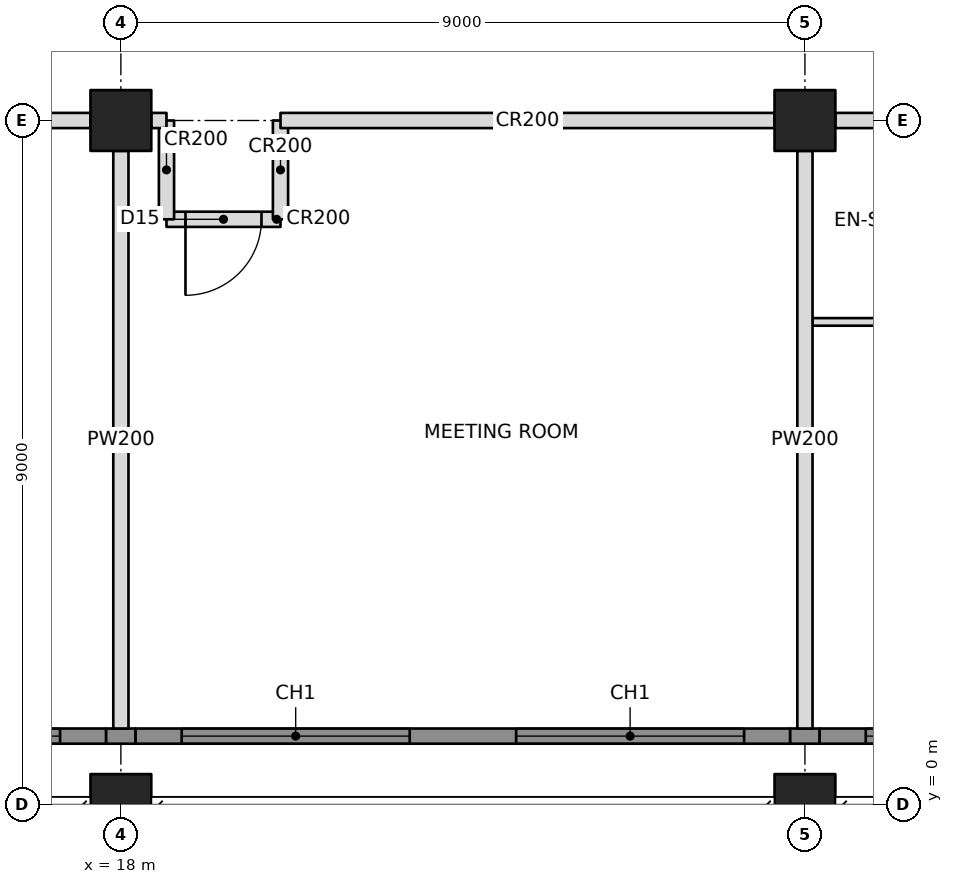
"""IFC4 building model, lengths in metres.
Left out: names, types, materials, properties, quantities, classifications, styles, units other than length and angle.
Written with IfcOpenShell. Run it as: python <this file> out.ifc"""

import sys

from ifc_helpers import new_model, si_unit, direction, frame, frame_2d, origin, origin_2d, place, context, subcontext, project, spatial, rectangle, hollow_rectangle, extrude, element, fill, save


model = new_model("IFC4")
c1 = context("Model", 3, precision=1e-05, world=origin(), true_north=direction((0.0, 1.0)))
c2 = subcontext(c1, "Body", "Model", "MODEL_VIEW")
j1 = project(units=[si_unit("LENGTHUNIT", "METRE"), si_unit("PLANEANGLEUNIT", "RADIAN")], contexts=[c1])
p1 = place(None, origin())
s1 = spatial("IfcSite", under=j1, at=p1, CompositionType="ELEMENT")
p2 = place(p1, origin())
s2 = spatial("IfcBuilding", under=s1, at=p2, CompositionType="ELEMENT")
p3 = place(p2, frame((0.0, 0.0, 28.0)))
s3 = spatial("IfcBuildingStorey", under=s2, at=p3, CompositionType="ELEMENT", Elevation=28.0)
for number, where, z_axis, x_axis in (
    (1, (18.0, 0.0, 0.0), (0.0, 0.0, 1.0), (1.0, 0.0, 0.0)),
    (2, (18.0, 9.0, 0.0), (0.0, 0.0, 1.0), (1.0, 0.0, 0.0)),
    (3, (27.0, 0.0, 0.0), (0.0, 0.0, 1.0), (1.0, 0.0, 0.0)),
    (4, (27.0, 9.0, 0.0), (0.0, 0.0, 1.0), (1.0, 0.0, 0.0)),
):
    element("IfcColumn", number, at=place(p3, frame(where, z_axis=z_axis, x_axis=x_axis)), inside=s3, PredefinedType="COLUMN", context=c2, shape_type="SweptSolid", body=[
        extrude(hollow_rectangle(XDim=0.8, YDim=0.8, WallThickness=0.1, at=origin_2d()), origin(), (0.0, 0.0, 1.0), 3.4),
    ])
p4 = place(p3, frame((18.4, 9.0, 0.0), z_axis=(0.0, 0.0, 1.0), x_axis=(1.0, 0.0, 0.0)))
e5 = element("IfcWall", 5, at=p4, inside=s3, PredefinedType="PARTITIONING", context=c2, shape_type="SweptSolid", body=[
    extrude(rectangle(XDim=0.2, YDim=0.2, at=frame_2d((0.1, 0.0))), origin(), (0.0, 0.0, 1.0), 2.405),
])
p5 = place(p3, frame((27.4, 9.0, 0.0), z_axis=(0.0, 0.0, 1.0), x_axis=(1.0, 0.0, 0.0)))
e6 = element("IfcWall", 6, at=p5, inside=s3, PredefinedType="PARTITIONING", context=c2, shape_type="SweptSolid", body=[
    extrude(rectangle(XDim=8.2, YDim=0.2, at=frame_2d((4.1, 0.0))), origin(), (0.0, 0.0, 1.0), 2.405),
])
p6 = place(p5, frame((2.95, 0.0, 0.0)))
e7 = element("IfcOpeningElement", 7, at=p6, cuts=e6, PredefinedType="OPENING", context=c2, shape_type="SweptSolid", body=[
    extrude(rectangle(XDim=0.9, YDim=2.1, at=frame_2d((0.45, 1.05))), frame((0.0, 0.11, 0.0), z_axis=(0.0, -1.0, 0.0), x_axis=(1.0, 0.0, 0.0)), (0.0, 0.0, 1.0), 0.22),
])
p7 = place(p5, frame((4.35, 0.0, 0.0)))
e8 = element("IfcOpeningElement", 8, at=p7, cuts=e6, PredefinedType="OPENING", context=c2, shape_type="SweptSolid", body=[
    extrude(rectangle(XDim=1.0, YDim=2.1, at=frame_2d((0.5, 1.05))), frame((0.0, 0.11, 0.0), z_axis=(0.0, -1.0, 0.0), x_axis=(1.0, 0.0, 0.0)), (0.0, 0.0, 1.0), 0.22),
])
for number, where, z_axis, x_axis in (
    (9, (18.0, 8.6, 0.0), (0.0, 0.0, 1.0), (0.0, -1.0, 0.0)),
    (10, (27.0, 8.6, 0.0), (0.0, 0.0, 1.0), (0.0, -1.0, 0.0)),
):
    element("IfcWall", number, at=place(p3, frame(where, z_axis=z_axis, x_axis=x_axis)), inside=s3, PredefinedType="PARTITIONING", context=c2, shape_type="SweptSolid", body=[
        extrude(rectangle(XDim=7.6, YDim=0.2, at=frame_2d((3.8, 0.0))), origin(), (0.0, 0.0, 1.0), 2.405),
    ])
for number, where, z_axis, x_axis in (
    (11, (11.1, 9.0, 0.0), (0.0, 0.0, 1.0), (1.0, 0.0, 0.0)),
    (12, (20.1, 9.0, 0.0), (0.0, 0.0, 1.0), (1.0, 0.0, 0.0)),
):
    element("IfcWall", number, at=place(p3, frame(where, z_axis=z_axis, x_axis=x_axis)), inside=s3, PredefinedType="PARTITIONING", context=c2, shape_type="SweptSolid", body=[
        extrude(rectangle(XDim=6.5, YDim=0.2, at=frame_2d((3.25, 0.0))), origin(), (0.0, 0.0, 1.0), 2.405),
    ])
for number, where, z_axis, x_axis in (
    (13, (18.6, 9.0, 0.0), (0.0, 0.0, 1.0), (0.0, -1.0, 0.0)),
    (14, (20.1, 9.0, 0.0), (0.0, 0.0, 1.0), (0.0, -1.0, 0.0)),
):
    element("IfcWall", number, at=place(p3, frame(where, z_axis=z_axis, x_axis=x_axis)), inside=s3, PredefinedType="PARTITIONING", context=c2, shape_type="SweptSolid", body=[
        extrude(rectangle(XDim=1.3, YDim=0.2, at=frame_2d((0.65, 0.0))), origin(), (0.0, 0.0, 1.0), 2.404),
    ])
p8 = place(p3, frame((18.6, 7.7, 0.0), z_axis=(0.0, 0.0, 1.0), x_axis=(1.0, 0.0, 0.0)))
e15 = element("IfcWall", 15, at=p8, inside=s3, PredefinedType="PARTITIONING", context=c2, shape_type="SweptSolid", body=[
    extrude(rectangle(XDim=1.5, YDim=0.2, at=frame_2d((0.75, 0.0))), origin(), (0.0, 0.0, 1.0), 3.2),
])
p9 = place(p8, frame((0.25, 0.0, 0.0)))
e16 = element("IfcOpeningElement", 16, at=p9, cuts=e15, PredefinedType="OPENING", context=c2, shape_type="SweptSolid", body=[
    extrude(rectangle(XDim=1.0, YDim=2.1, at=frame_2d((0.5, 1.05))), frame((0.0, 0.11, 0.0), z_axis=(0.0, -1.0, 0.0), x_axis=(1.0, 0.0, 0.0)), (0.0, 0.0, 1.0), 0.22),
])
p10 = place(p3, frame((27.1, 6.35, 0.0), z_axis=(0.0, 0.0, 1.0), x_axis=(1.0, 0.0, 0.0)))
e17 = element("IfcWall", 17, at=p10, inside=s3, PredefinedType="PARTITIONING", context=c2, shape_type="SweptSolid", body=[
    extrude(rectangle(XDim=2.95, YDim=0.1, at=frame_2d((1.475, 0.0))), origin(), (0.0, 0.0, 1.0), 2.404),
])
p11 = place(p3, frame((9.135, 0.9, 0.0), z_axis=(0.0, 0.0, 1.0), x_axis=(1.0, 0.0, 0.0)))
e18 = element("IfcWall", 18, at=p11, inside=s3, PredefinedType="SOLIDWALL", context=c2, shape_type="SweptSolid", body=[
    extrude(rectangle(XDim=8.671, YDim=0.2, at=frame_2d((4.335, 0.0))), origin(), (0.0, 0.0, 1.0), 3.2),
])
p12 = place(p11, frame((0.665, 0.0, 0.6)))
e19 = element("IfcOpeningElement", 19, at=p12, cuts=e18, PredefinedType="OPENING", context=c2, shape_type="SweptSolid", body=[
    extrude(rectangle(XDim=3.0, YDim=2.2, at=frame_2d((1.5, 1.1))), frame((0.0, 0.11, 0.0), z_axis=(0.0, -1.0, 0.0), x_axis=(1.0, 0.0, 0.0)), (0.0, 0.0, 1.0), 0.22),
])
p13 = place(p11, frame((5.065, 0.0, 0.6)))
e20 = element("IfcOpeningElement", 20, at=p13, cuts=e18, PredefinedType="OPENING", context=c2, shape_type="SweptSolid", body=[
    extrude(rectangle(XDim=3.0, YDim=2.2, at=frame_2d((1.5, 1.1))), frame((0.0, 0.11, 0.0), z_axis=(0.0, -1.0, 0.0), x_axis=(1.0, 0.0, 0.0)), (0.0, 0.0, 1.0), 0.22),
])
p14 = place(p3, frame((17.806, 0.9, 0.0), z_axis=(0.0, 0.0, 1.0), x_axis=(1.0, 0.0, 0.0)))
e21 = element("IfcWall", 21, at=p14, inside=s3, PredefinedType="SOLIDWALL", context=c2, shape_type="SweptSolid", body=[
    extrude(rectangle(XDim=0.388, YDim=0.2, at=frame_2d((0.194, 0.0))), origin(), (0.0, 0.0, 1.0), 2.404),
])
p15 = place(p3, frame((18.194, 0.9, 0.0), z_axis=(0.0, 0.0, 1.0), x_axis=(1.0, 0.0, 0.0)))
e22 = element("IfcWall", 22, at=p15, inside=s3, PredefinedType="SOLIDWALL", context=c2, shape_type="SweptSolid", body=[
    extrude(rectangle(XDim=8.612, YDim=0.2, at=frame_2d((4.306, 0.0))), origin(), (0.0, 0.0, 1.0), 3.2),
])
p16 = place(p15, frame((0.606, 0.0, 0.6)))
e23 = element("IfcOpeningElement", 23, at=p16, cuts=e22, PredefinedType="OPENING", context=c2, shape_type="SweptSolid", body=[
    extrude(rectangle(XDim=3.0, YDim=2.2, at=frame_2d((1.5, 1.1))), frame((0.0, 0.11, 0.0), z_axis=(0.0, -1.0, 0.0), x_axis=(1.0, 0.0, 0.0)), (0.0, 0.0, 1.0), 0.22),
])
p17 = place(p15, frame((5.006, 0.0, 0.6)))
e24 = element("IfcOpeningElement", 24, at=p17, cuts=e22, PredefinedType="OPENING", context=c2, shape_type="SweptSolid", body=[
    extrude(rectangle(XDim=3.0, YDim=2.2, at=frame_2d((1.5, 1.1))), frame((0.0, 0.11, 0.0), z_axis=(0.0, -1.0, 0.0), x_axis=(1.0, 0.0, 0.0)), (0.0, 0.0, 1.0), 0.22),
])
p18 = place(p3, frame((26.806, 0.9, 0.0), z_axis=(0.0, 0.0, 1.0), x_axis=(1.0, 0.0, 0.0)))
e25 = element("IfcWall", 25, at=p18, inside=s3, PredefinedType="SOLIDWALL", context=c2, shape_type="SweptSolid", body=[
    extrude(rectangle(XDim=0.388, YDim=0.2, at=frame_2d((0.194, 0.0))), origin(), (0.0, 0.0, 1.0), 2.404),
])
p19 = place(p3, frame((27.194, 0.9, 0.0), z_axis=(0.0, 0.0, 1.0), x_axis=(1.0, 0.0, 0.0)))
e26 = element("IfcWall", 26, at=p19, inside=s3, PredefinedType="SOLIDWALL", context=c2, shape_type="SweptSolid", body=[
    extrude(rectangle(XDim=8.671, YDim=0.2, at=frame_2d((4.335, 0.0))), origin(), (0.0, 0.0, 1.0), 3.2),
])
p20 = place(p19, frame((0.606, 0.0, 0.6)))
e27 = element("IfcOpeningElement", 27, at=p20, cuts=e26, PredefinedType="OPENING", context=c2, shape_type="SweptSolid", body=[
    extrude(rectangle(XDim=3.0, YDim=2.2, at=frame_2d((1.5, 1.1))), frame((0.0, 0.11, 0.0), z_axis=(0.0, -1.0, 0.0), x_axis=(1.0, 0.0, 0.0)), (0.0, 0.0, 1.0), 0.22),
])
p21 = place(p19, frame((5.006, 0.0, 0.6)))
e28 = element("IfcOpeningElement", 28, at=p21, cuts=e26, PredefinedType="OPENING", context=c2, shape_type="SweptSolid", body=[
    extrude(rectangle(XDim=3.0, YDim=2.2, at=frame_2d((1.5, 1.1))), frame((0.0, 0.11, 0.0), z_axis=(0.0, -1.0, 0.0), x_axis=(1.0, 0.0, 0.0)), (0.0, 0.0, 1.0), 0.22),
])
p22 = place(p13, origin())
e29 = element("IfcWindow", 29, at=p22, inside=s3, PartitioningType="TRIPLE_PANEL_VERTICAL", PredefinedType="WINDOW", context=c2, shape_type="SweptSolid", body=[
    extrude(rectangle(XDim=3.0, YDim=2.2, at=frame_2d((1.5, 1.1))), frame((0.0, 0.03, 0.0), z_axis=(0.0, -1.0, 0.0), x_axis=(1.0, 0.0, 0.0)), (0.0, 0.0, 1.0), 0.06),
])
fill(e20, e29)
p23 = place(p16, origin())
e30 = element("IfcWindow", 30, at=p23, inside=s3, PartitioningType="TRIPLE_PANEL_VERTICAL", PredefinedType="WINDOW", context=c2, shape_type="SweptSolid", body=[
    extrude(rectangle(XDim=3.0, YDim=2.2, at=frame_2d((1.5, 1.1))), frame((0.0, 0.03, 0.0), z_axis=(0.0, -1.0, 0.0), x_axis=(1.0, 0.0, 0.0)), (0.0, 0.0, 1.0), 0.06),
])
fill(e23, e30)
p24 = place(p17, origin())
e31 = element("IfcWindow", 31, at=p24, inside=s3, PartitioningType="TRIPLE_PANEL_VERTICAL", PredefinedType="WINDOW", context=c2, shape_type="SweptSolid", body=[
    extrude(rectangle(XDim=3.0, YDim=2.2, at=frame_2d((1.5, 1.1))), frame((0.0, 0.03, 0.0), z_axis=(0.0, -1.0, 0.0), x_axis=(1.0, 0.0, 0.0)), (0.0, 0.0, 1.0), 0.06),
])
fill(e24, e31)
p25 = place(p20, origin())
e32 = element("IfcWindow", 32, at=p25, inside=s3, PartitioningType="TRIPLE_PANEL_VERTICAL", PredefinedType="WINDOW", context=c2, shape_type="SweptSolid", body=[
    extrude(rectangle(XDim=3.0, YDim=2.2, at=frame_2d((1.5, 1.1))), frame((0.0, 0.03, 0.0), z_axis=(0.0, -1.0, 0.0), x_axis=(1.0, 0.0, 0.0)), (0.0, 0.0, 1.0), 0.06),
])
fill(e27, e32)
p26 = place(p9, frame((1.0, 0.0, 0.0), z_axis=(0.0, 0.0, 1.0), x_axis=(-1.0, 0.0, 0.0)))
e33 = element("IfcDoor", 33, at=p26, inside=s3, OperationType="SINGLE_SWING_RIGHT", PredefinedType="DOOR", context=c2, shape_type="SweptSolid", body=[
    extrude(rectangle(XDim=1.0, YDim=2.1, at=frame_2d((0.5, 1.05))), frame((0.0, 0.025, 0.0), z_axis=(0.0, -1.0, 0.0), x_axis=(1.0, 0.0, 0.0)), (0.0, 0.0, 1.0), 0.05),
])
fill(e16, e33)
save(model, sys.argv[1])
